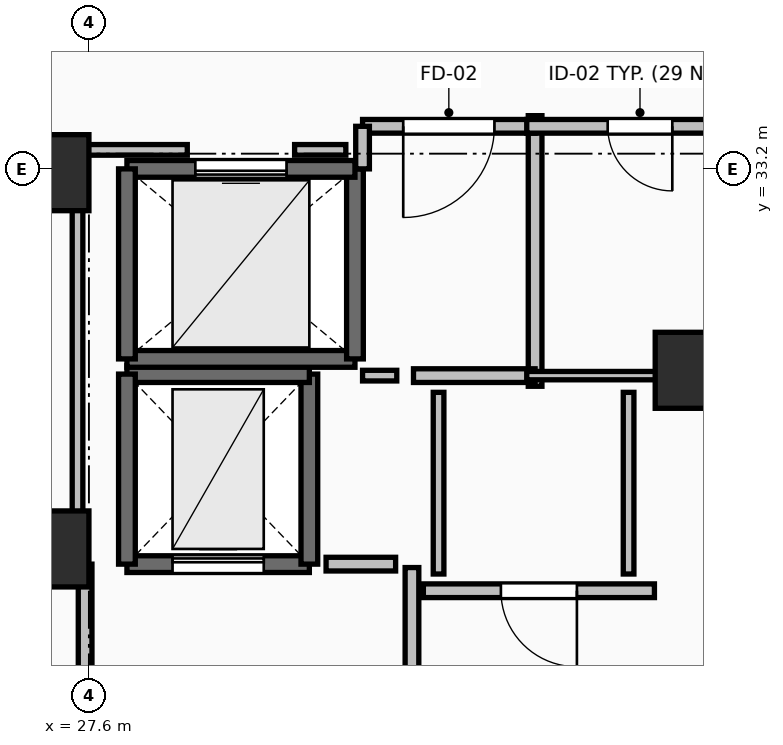
"""IFC4 building model, lengths in metres.
Left out: names, types, materials, properties, quantities, classifications, styles, units other than length and angle.
Written with IfcOpenShell. Run it as: python <this file> out.ifc"""

import sys

from ifc_helpers import new_model, si_unit, direction, frame, frame_2d, origin, origin_2d, place, context, subcontext, project, spatial, rectangle, extrude, element, fill, save


model = new_model("IFC4")
c1 = context("Model", 3, precision=1e-05, world=origin(), true_north=direction((0.0, 1.0)))
c2 = subcontext(c1, "Body", "Model", "MODEL_VIEW")
j1 = project(units=[si_unit("LENGTHUNIT", "METRE"), si_unit("PLANEANGLEUNIT", "RADIAN")], contexts=[c1])
p1 = place(None, origin())
s1 = spatial("IfcSite", under=j1, at=p1, CompositionType="ELEMENT")
p2 = place(p1, origin())
s2 = spatial("IfcBuilding", under=s1, at=p2, CompositionType="ELEMENT")
p3 = place(p2, frame((0.0, 0.0, 200.1)))
s3 = spatial("IfcBuildingStorey", under=s2, at=p3, CompositionType="ELEMENT", Elevation=200.1)
for number, where, z_axis, x_axis in (
    (1, (27.25, 28.2, 0.0), (0.0, 0.0, 1.0), (1.0, 0.0, 0.0)),
    (2, (27.25, 33.15, 0.0), (0.0, 0.0, 1.0), (1.0, 0.0, 0.0)),
    (3, (35.4, 30.55, 0.0), (0.0, 0.0, 1.0), (1.0, 0.0, 0.0)),
):
    element("IfcColumn", number, at=place(p3, frame(where, z_axis=z_axis, x_axis=x_axis)), inside=s3, PredefinedType="PILASTER", context=c2, shape_type="SweptSolid", body=[
        extrude(rectangle(XDim=0.7, YDim=1.0, at=origin_2d()), origin(), (0.0, 0.0, 1.0), 3.55),
    ])
p4 = place(p3, frame((28.1, 28.0, 0.0), z_axis=(0.0, 0.0, 1.0), x_axis=(1.0, 0.0, 0.0)))
e4 = element("IfcWall", 4, at=p4, inside=s3, PredefinedType="SHEAR", context=c2, shape_type="SweptSolid", body=[
    extrude(rectangle(XDim=2.4, YDim=0.22, at=frame_2d((1.2, 0.0))), origin(), (0.0, 0.0, 1.0), 3.29),
])
p5 = place(p4, frame((0.6, 0.0, 0.0)))
e5 = element("IfcOpeningElement", 5, at=p5, cuts=e4, PredefinedType="OPENING", context=c2, shape_type="SweptSolid", body=[
    extrude(rectangle(XDim=1.2, YDim=2.2, at=frame_2d((0.6, 1.1))), frame((0.0, 0.125, 0.0), z_axis=(0.0, -1.0, 0.0), x_axis=(1.0, 0.0, 0.0)), (0.0, 0.0, 1.0), 0.25),
])
p6 = place(p3, frame((30.5, 28.0, 0.0), z_axis=(0.0, 0.0, 1.0), x_axis=(0.0, 1.0, 0.0)))
e6 = element("IfcWall", 6, at=p6, inside=s3, PredefinedType="SHEAR", context=c2, shape_type="SweptSolid", body=[
    extrude(rectangle(XDim=2.5, YDim=0.22, at=frame_2d((1.25, 0.0))), origin(), (0.0, 0.0, 1.0), 3.29),
])
p7 = place(p3, frame((30.5, 30.5, 0.0), z_axis=(0.0, 0.0, 1.0), x_axis=(-1.0, 0.0, 0.0)))
e7 = element("IfcWall", 7, at=p7, inside=s3, PredefinedType="SHEAR", context=c2, shape_type="SweptSolid", body=[
    extrude(rectangle(XDim=2.4, YDim=0.22, at=frame_2d((1.2, 0.0))), origin(), (0.0, 0.0, 1.0), 3.29),
])
p8 = place(p3, frame((28.1, 30.5, 0.0), z_axis=(0.0, 0.0, 1.0), x_axis=(0.0, -1.0, 0.0)))
e8 = element("IfcWall", 8, at=p8, inside=s3, PredefinedType="SHEAR", context=c2, shape_type="SweptSolid", body=[
    extrude(rectangle(XDim=2.5, YDim=0.22, at=frame_2d((1.25, 0.0))), origin(), (0.0, 0.0, 1.0), 3.29),
])
p9 = place(p3, frame((28.1, 30.7, 0.0), z_axis=(0.0, 0.0, 1.0), x_axis=(1.0, 0.0, 0.0)))
e9 = element("IfcWall", 9, at=p9, inside=s3, PredefinedType="SOLIDWALL", context=c2, shape_type="SweptSolid", body=[
    extrude(rectangle(XDim=3.0, YDim=0.22, at=frame_2d((1.5, 0.0))), origin(), (0.0, 0.0, 1.0), 3.29),
])
p10 = place(p3, frame((31.1, 30.7, 0.0), z_axis=(0.0, 0.0, 1.0), x_axis=(0.0, 1.0, 0.0)))
e10 = element("IfcWall", 10, at=p10, inside=s3, PredefinedType="SOLIDWALL", context=c2, shape_type="SweptSolid", body=[
    extrude(rectangle(XDim=2.5, YDim=0.22, at=frame_2d((1.25, 0.0))), origin(), (0.0, 0.0, 1.0), 3.29),
])
p11 = place(p3, frame((31.1, 33.2, 0.0), z_axis=(0.0, 0.0, 1.0), x_axis=(-1.0, 0.0, 0.0)))
e11 = element("IfcWall", 11, at=p11, inside=s3, PredefinedType="SOLIDWALL", context=c2, shape_type="SweptSolid", body=[
    extrude(rectangle(XDim=3.0, YDim=0.22, at=frame_2d((1.5, 0.0))), origin(), (0.0, 0.0, 1.0), 3.29),
])
p12 = place(p11, frame((0.9, 0.0, 0.0)))
e12 = element("IfcOpeningElement", 12, at=p12, cuts=e11, PredefinedType="OPENING", context=c2, shape_type="SweptSolid", body=[
    extrude(rectangle(XDim=1.2, YDim=2.2, at=frame_2d((0.6, 1.1))), frame((0.0, 0.125, 0.0), z_axis=(0.0, -1.0, 0.0), x_axis=(1.0, 0.0, 0.0)), (0.0, 0.0, 1.0), 0.25),
])
p13 = place(p3, frame((28.1, 33.2, 0.0), z_axis=(0.0, 0.0, 1.0), x_axis=(0.0, -1.0, 0.0)))
e13 = element("IfcWall", 13, at=p13, inside=s3, PredefinedType="SOLIDWALL", context=c2, shape_type="SweptSolid", body=[
    extrude(rectangle(XDim=2.5, YDim=0.22, at=frame_2d((1.25, 0.0))), origin(), (0.0, 0.0, 1.0), 3.29),
])
p14 = place(p3, frame((31.85, 24.045, 0.0), z_axis=(0.0, 0.0, 1.0), x_axis=(0.0, 1.0, 0.0)))
e14 = element("IfcWall", 14, at=p14, inside=s3, PredefinedType="PARTITIONING", context=c2, shape_type="SweptSolid", body=[
    extrude(rectangle(XDim=3.91, YDim=0.18, at=frame_2d((1.955, 0.0))), origin(), (0.0, 0.0, 1.0), 3.29),
])
p15 = place(p14, frame((1.355, 0.0, 0.0)))
e15 = element("IfcOpeningElement", 15, at=p15, cuts=e14, PredefinedType="OPENING", context=c2, shape_type="SweptSolid", body=[
    extrude(rectangle(XDim=1.2, YDim=2.15, at=frame_2d((0.6, 1.075))), frame((0.0, 0.105, 0.0), z_axis=(0.0, -1.0, 0.0), x_axis=(1.0, 0.0, 0.0)), (0.0, 0.0, 1.0), 0.21),
])
p16 = place(p3, frame((27.55, 28.0, 0.0), z_axis=(0.0, 0.0, 1.0), x_axis=(0.0, -1.0, 0.0)))
e16 = element("IfcWall", 16, at=p16, inside=s3, PredefinedType="PARTITIONING", context=c2, shape_type="SweptSolid", body=[
    extrude(rectangle(XDim=4.05, YDim=0.18, at=frame_2d((2.025, 0.0))), origin(), (0.0, 0.0, 1.0), 3.29),
])
p17 = place(p16, frame((1.425, 0.0, 0.0)))
e17 = element("IfcOpeningElement", 17, at=p17, cuts=e16, PredefinedType="OPENING", context=c2, shape_type="SweptSolid", body=[
    extrude(rectangle(XDim=1.2, YDim=2.15, at=frame_2d((0.6, 1.075))), frame((0.0, 0.105, 0.0), z_axis=(0.0, -1.0, 0.0), x_axis=(1.0, 0.0, 0.0)), (0.0, 0.0, 1.0), 0.21),
])
p18 = place(p3, frame((33.47, 30.34, 0.0), z_axis=(0.0, 0.0, 1.0), x_axis=(0.0, 1.0, 0.0)))
e18 = element("IfcWall", 18, at=p18, inside=s3, PredefinedType="PARTITIONING", context=c2, shape_type="SweptSolid", body=[
    extrude(rectangle(XDim=3.56, YDim=0.18, at=frame_2d((1.78, 0.0))), origin(), (0.0, 0.0, 1.0), 3.29),
])
p19 = place(p3, frame((31.87, 30.48, 0.0), z_axis=(0.0, 0.0, 1.0), x_axis=(1.0, 0.0, 0.0)))
e19 = element("IfcWall", 19, at=p19, inside=s3, PredefinedType="PARTITIONING", context=c2, shape_type="SweptSolid", body=[
    extrude(rectangle(XDim=1.6, YDim=0.18, at=frame_2d((0.8, 0.0))), origin(), (0.0, 0.0, 1.0), 3.29),
])
p20 = place(p3, frame((33.47, 33.76, 0.0), z_axis=(0.0, 0.0, 1.0), x_axis=(-1.0, 0.0, 0.0)))
e20 = element("IfcWall", 20, at=p20, inside=s3, PredefinedType="PARTITIONING", context=c2, shape_type="SweptSolid", body=[
    extrude(rectangle(XDim=2.27, YDim=0.18, at=frame_2d((1.135, 0.0))), origin(), (0.0, 0.0, 1.0), 3.29),
])
p21 = place(p20, frame((0.535, 0.0, 0.0)))
e21 = element("IfcOpeningElement", 21, at=p21, cuts=e20, PredefinedType="OPENING", context=c2, shape_type="SweptSolid", body=[
    extrude(rectangle(XDim=1.2, YDim=2.15, at=frame_2d((0.6, 1.075))), frame((0.0, 0.105, 0.0), z_axis=(0.0, -1.0, 0.0), x_axis=(1.0, 0.0, 0.0)), (0.0, 0.0, 1.0), 0.21),
])
p22 = place(p3, frame((31.2, 33.76, 0.0), z_axis=(0.0, 0.0, 1.0), x_axis=(0.0, -1.0, 0.0)))
e22 = element("IfcWall", 22, at=p22, inside=s3, PredefinedType="PARTITIONING", context=c2, shape_type="SweptSolid", body=[
    extrude(rectangle(XDim=0.56, YDim=0.18, at=frame_2d((0.28, 0.0))), origin(), (0.0, 0.0, 1.0), 3.29),
])
p23 = place(p3, frame((35.04, 27.65, 0.0), z_axis=(0.0, 0.0, 1.0), x_axis=(-1.0, 0.0, 0.0)))
e23 = element("IfcWall", 23, at=p23, inside=s3, PredefinedType="PARTITIONING", context=c2, shape_type="SweptSolid", body=[
    extrude(rectangle(XDim=3.04, YDim=0.18, at=frame_2d((1.52, 0.0))), origin(), (0.0, 0.0, 1.0), 3.29),
])
p24 = place(p23, frame((1.02, 0.0, 0.0)))
e24 = element("IfcOpeningElement", 24, at=p24, cuts=e23, PredefinedType="OPENING", context=c2, shape_type="SweptSolid", body=[
    extrude(rectangle(XDim=1.0, YDim=2.15, at=frame_2d((0.5, 1.075))), frame((0.0, 0.105, 0.0), z_axis=(0.0, -1.0, 0.0), x_axis=(1.0, 0.0, 0.0)), (0.0, 0.0, 1.0), 0.21),
])
p25 = place(p3, frame((33.36, 30.48, 0.0), z_axis=(0.0, 0.0, 1.0), x_axis=(1.0, 0.0, 0.0)))
e25 = element("IfcWall", 25, at=p25, inside=s3, PredefinedType="PARTITIONING", context=c2, shape_type="SweptSolid", body=[
    extrude(rectangle(XDim=1.81, YDim=0.11, at=frame_2d((0.905, 0.0))), origin(), (0.0, 0.0, 1.0), 3.29),
])
p26 = place(p3, frame((36.34, 33.76, 0.0), z_axis=(0.0, 0.0, 1.0), x_axis=(-1.0, 0.0, 0.0)))
e26 = element("IfcWall", 26, at=p26, inside=s3, PredefinedType="PARTITIONING", context=c2, shape_type="SweptSolid", body=[
    extrude(rectangle(XDim=2.98, YDim=0.18, at=frame_2d((1.49, 0.0))), origin(), (0.0, 0.0, 1.0), 3.29),
])
p27 = place(p26, frame((1.065, 0.0, 0.0)))
e27 = element("IfcOpeningElement", 27, at=p27, cuts=e26, PredefinedType="OPENING", context=c2, shape_type="SweptSolid", body=[
    extrude(rectangle(XDim=0.85, YDim=2.1, at=frame_2d((0.425, 1.05))), frame((0.0, 0.105, 0.0), z_axis=(0.0, -1.0, 0.0), x_axis=(1.0, 0.0, 0.0)), (0.0, 0.0, 1.0), 0.21),
])
p28 = place(p3, frame((31.635, 28.0, 0.0), z_axis=(0.0, 0.0, 1.0), x_axis=(-1.0, 0.0, 0.0)))
e28 = element("IfcWall", 28, at=p28, inside=s3, PredefinedType="PARTITIONING", context=c2, shape_type="SweptSolid", body=[
    extrude(rectangle(XDim=0.915, YDim=0.18, at=frame_2d((0.458, 0.0))), origin(), (0.0, 0.0, 1.0), 3.29),
])
p29 = place(p3, frame((31.2, 30.48, 0.0), z_axis=(0.0, 0.0, 1.0), x_axis=(1.0, 0.0, 0.0)))
e29 = element("IfcWall", 29, at=p29, inside=s3, PredefinedType="PARTITIONING", context=c2, shape_type="SweptSolid", body=[
    extrude(rectangle(XDim=0.45, YDim=0.14, at=frame_2d((0.225, 0.0))), origin(), (0.0, 0.0, 1.0), 3.29),
])
p30 = place(p3, frame((35.14, 30.48, 0.0), z_axis=(0.0, 0.0, 1.0), x_axis=(1.0, 0.0, 0.0)))
e30 = element("IfcWall", 30, at=p30, inside=s3, PredefinedType="PARTITIONING", context=c2, shape_type="SweptSolid", body=[
    extrude(rectangle(XDim=1.0, YDim=0.14, at=frame_2d((0.5, 0.0))), origin(), (0.0, 0.0, 1.0), 2.482),
])
for number, where, z_axis, x_axis in (
    (31, (32.2, 30.26, 0.0), (0.0, 0.0, 1.0), (0.0, -1.0, 0.0)),
    (32, (34.7, 27.87, 0.0), (0.0, 0.0, 1.0), (0.0, 1.0, 0.0)),
):
    element("IfcWall", number, at=place(p3, frame(where, z_axis=z_axis, x_axis=x_axis)), inside=s3, PredefinedType="PARTITIONING", context=c2, shape_type="SweptSolid", body=[
        extrude(rectangle(XDim=2.39, YDim=0.14, at=frame_2d((1.195, 0.0))), origin(), (0.0, 0.0, 1.0), 3.29),
    ])
p31 = place(p3, frame((30.98, 33.45, 0.0), z_axis=(0.0, 0.0, 1.0), x_axis=(-1.0, 0.0, 0.0)))
e33 = element("IfcWall", 33, at=p31, inside=s3, PredefinedType="PARTITIONING", context=c2, shape_type="SweptSolid", body=[
    extrude(rectangle(XDim=0.674, YDim=0.14, at=frame_2d((0.337, 0.0))), origin(), (0.0, 0.0, 1.0), 3.29),
])
p32 = place(p3, frame((28.894, 33.45, 0.0), z_axis=(0.0, 0.0, 1.0), x_axis=(-1.0, 0.0, 0.0)))
e34 = element("IfcWall", 34, at=p32, inside=s3, PredefinedType="PARTITIONING", context=c2, shape_type="SweptSolid", body=[
    extrude(rectangle(XDim=1.444, YDim=0.14, at=frame_2d((0.722, 0.0))), origin(), (0.0, 0.0, 1.0), 2.482),
])
p33 = place(p3, frame((27.45, 33.45, 0.0), z_axis=(0.0, 0.0, 1.0), x_axis=(0.0, -1.0, 0.0)))
e35 = element("IfcWall", 35, at=p33, inside=s3, PredefinedType="PARTITIONING", context=c2, shape_type="SweptSolid", body=[
    extrude(rectangle(XDim=5.254, YDim=0.14, at=frame_2d((2.627, 0.0))), origin(), (0.0, 0.0, 1.0), 2.482),
])
p34 = place(p5, origin())
e36 = element("IfcDoor", 36, at=p34, inside=s3, OperationType="SLIDING_TO_LEFT", PredefinedType="DOOR", context=c2, shape_type="SweptSolid", body=[
    extrude(rectangle(XDim=1.2, YDim=2.2, at=frame_2d((0.6, 1.1))), frame((0.0, 0.025, 0.0), z_axis=(0.0, -1.0, 0.0), x_axis=(1.0, 0.0, 0.0)), (0.0, 0.0, 1.0), 0.05),
])
fill(e5, e36)
p35 = place(p12, origin())
e37 = element("IfcDoor", 37, at=p35, inside=s3, OperationType="SLIDING_TO_LEFT", PredefinedType="DOOR", context=c2, shape_type="SweptSolid", body=[
    extrude(rectangle(XDim=1.2, YDim=2.2, at=frame_2d((0.6, 1.1))), frame((0.0, 0.025, 0.0), z_axis=(0.0, -1.0, 0.0), x_axis=(1.0, 0.0, 0.0)), (0.0, 0.0, 1.0), 0.05),
])
fill(e12, e37)
p36 = place(p21, origin())
e38 = element("IfcDoor", 38, at=p36, inside=s3, OperationType="SINGLE_SWING_RIGHT", PredefinedType="DOOR", context=c2, shape_type="SweptSolid", body=[
    extrude(rectangle(XDim=1.2, YDim=2.15, at=frame_2d((0.6, 1.075))), frame((0.0, 0.025, 0.0), z_axis=(0.0, -1.0, 0.0), x_axis=(1.0, 0.0, 0.0)), (0.0, 0.0, 1.0), 0.05),
])
fill(e21, e38)
p37 = place(p24, origin())
e39 = element("IfcDoor", 39, at=p37, inside=s3, OperationType="SINGLE_SWING_LEFT", PredefinedType="DOOR", context=c2, shape_type="SweptSolid", body=[
    extrude(rectangle(XDim=1.0, YDim=2.15, at=frame_2d((0.5, 1.075))), frame((0.0, 0.025, 0.0), z_axis=(0.0, -1.0, 0.0), x_axis=(1.0, 0.0, 0.0)), (0.0, 0.0, 1.0), 0.05),
])
fill(e24, e39)
p38 = place(p27, origin())
e40 = element("IfcDoor", 40, at=p38, inside=s3, OperationType="SINGLE_SWING_LEFT", PredefinedType="DOOR", context=c2, shape_type="SweptSolid", body=[
    extrude(rectangle(XDim=0.85, YDim=2.1, at=frame_2d((0.425, 1.05))), frame((0.0, 0.025, 0.0), z_axis=(0.0, -1.0, 0.0), x_axis=(1.0, 0.0, 0.0)), (0.0, 0.0, 1.0), 0.05),
])
fill(e27, e40)
save(model, sys.argv[1])
